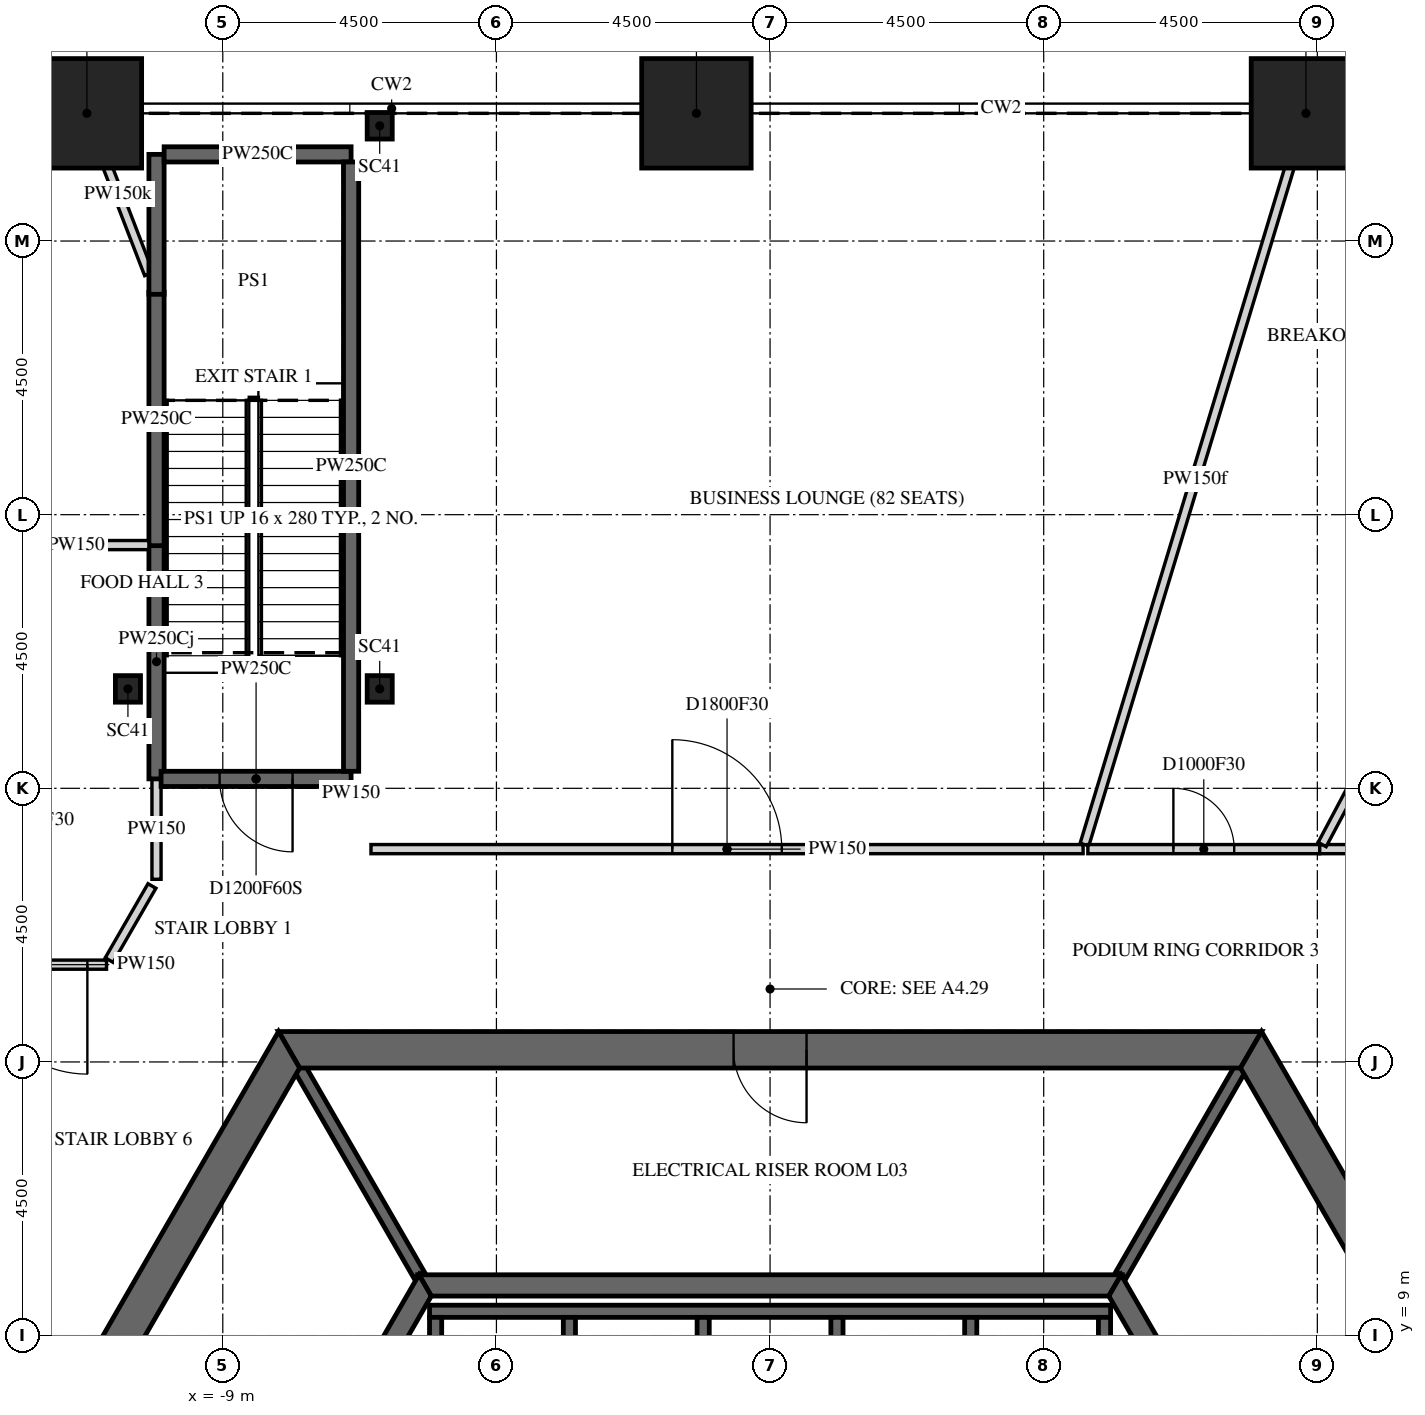
"""IFC4 building model, lengths in metres.
Left out: names, types, materials, properties, quantities, classifications, styles, units other than length and angle.
Written with IfcOpenShell. Run it as: python <this file> out.ifc"""

import sys

from ifc_helpers import new_model, si_unit, direction, frame, frame_2d, origin, origin_2d, place, context, subcontext, project, spatial, polyline, rectangle, i_section, outline, extrude, element, fill, save


model = new_model("IFC4")
c1 = context("Model", 3, precision=1e-05, world=origin(), true_north=direction((0.0, 1.0)))
c2 = subcontext(c1, "Body", "Model", "MODEL_VIEW")
j1 = project(units=[si_unit("LENGTHUNIT", "METRE"), si_unit("PLANEANGLEUNIT", "RADIAN")], contexts=[c1])
p1 = place(None, origin())
s1 = spatial("IfcSite", under=j1, at=p1, CompositionType="ELEMENT")
p2 = place(p1, origin())
s2 = spatial("IfcBuilding", under=s1, at=p2, CompositionType="ELEMENT")
p3 = place(p2, frame((0.0, 0.0, 20.5)))
s3 = spatial("IfcBuildingStorey", under=s2, at=p3, CompositionType="ELEMENT", Elevation=20.5)
for number, where, z_axis, x_axis in (
    (1, (8.812, 29.1, -0.25), (0.0, 0.0, 1.0), (1.0, 0.0, 0.0)),
    (2, (-1.211, 29.1, -0.25), (0.0, 0.0, 1.0), (1.0, 0.0, 0.0)),
    (3, (-11.235, 29.1, -0.25), (0.0, 0.0, 1.0), (1.0, 0.0, 0.0)),
):
    element("IfcColumn", number, at=place(p3, frame(where, z_axis=z_axis, x_axis=x_axis)), inside=s3, PredefinedType="COLUMN", context=c2, shape_type="SweptSolid", body=[
        extrude(rectangle(XDim=1.8, YDim=1.8, at=origin_2d()), origin(), (0.0, 0.0, 1.0), 5.5),
    ])
for number, where, z_axis, x_axis in (
    (4, (-6.419, 28.895, -0.25), (0.0, 0.0, 1.0), (1.0, 0.0, 0.0)),
    (5, (-6.419, 19.635, -0.25), (0.0, 0.0, 1.0), (1.0, 0.0, 0.0)),
    (6, (-10.56, 19.635, -0.25), (0.0, 0.0, 1.0), (1.0, 0.0, 0.0)),
):
    element("IfcColumn", number, at=place(p3, frame(where, z_axis=z_axis, x_axis=x_axis)), inside=s3, PredefinedType="COLUMN", context=c2, shape_type="SweptSolid", body=[
        extrude(i_section(OverallWidth=0.412, OverallDepth=0.437, WebThickness=0.036, FlangeThickness=0.058, FilletRadius=0.015, at=origin_2d()), origin(), (0.0, 0.0, 1.0), 5.5),
    ])
p4 = place(p3, frame((-7.91, 13.7, -0.25), z_axis=(0.0, 0.0, 1.0), x_axis=(-0.499999880136, -0.866025472988, 0.0)))
e7 = element("IfcWall", 7, at=p4, inside=s3, PredefinedType="SHEAR", context=c2, shape_type="SweptSolid", body=[
    extrude(outline(polyline([(-0.173, -0.3), (15.993, -0.3), (15.646, 0.3), (0.173, 0.3), (-0.173, -0.3)])), origin(), (0.0, 0.0, 1.0), 5.5),
])
p5 = place(p4, frame((7.039, 0.0, 0.25)))
e8 = element("IfcOpeningElement", 8, at=p5, cuts=e7, PredefinedType="OPENING", context=c2, shape_type="SweptSolid", body=[
    extrude(rectangle(XDim=1.8, YDim=2.4, at=frame_2d((0.9, 1.2))), frame((0.0, 0.31, 0.0), z_axis=(0.0, -1.0, 0.0), x_axis=(1.0, 0.0, 0.0)), (0.0, 0.0, 1.0), 0.62),
])
p6 = place(p3, frame((15.819, 0.0, -0.25), z_axis=(0.0, 0.0, 1.0), x_axis=(-0.499999880136, 0.866025472988, 0.0)))
e9 = element("IfcWall", 9, at=p6, inside=s3, PredefinedType="SHEAR", context=c2, shape_type="SweptSolid", body=[
    extrude(outline(polyline([(-0.173, -0.3), (15.993, -0.3), (15.646, 0.3), (0.173, 0.3), (-0.173, -0.3)])), origin(), (0.0, 0.0, 1.0), 5.5),
])
p7 = place(p6, frame((6.981, 0.0, 0.25)))
e10 = element("IfcOpeningElement", 10, at=p7, cuts=e9, PredefinedType="OPENING", context=c2, shape_type="SweptSolid", body=[
    extrude(rectangle(XDim=1.8, YDim=2.4, at=frame_2d((0.9, 1.2))), frame((0.0, 0.31, 0.0), z_axis=(0.0, -1.0, 0.0), x_axis=(1.0, 0.0, 0.0)), (0.0, 0.0, 1.0), 0.62),
])
p8 = place(p3, frame((7.91, 13.7, -0.25), z_axis=(0.0, 0.0, 1.0), x_axis=(-1.0, 0.0, 0.0)))
e11 = element("IfcWall", 11, at=p8, inside=s3, PredefinedType="SHEAR", context=c2, shape_type="SweptSolid", body=[
    extrude(outline(polyline([(-0.173, -0.3), (15.993, -0.3), (15.646, 0.3), (0.173, 0.3), (-0.173, -0.3)])), origin(), (0.0, 0.0, 1.0), 5.5),
])
p9 = place(p8, frame((7.31, 0.0, 0.25)))
e12 = element("IfcOpeningElement", 12, at=p9, cuts=e11, PredefinedType="OPENING", context=c2, shape_type="SweptSolid", body=[
    extrude(rectangle(XDim=1.2, YDim=2.4, at=frame_2d((0.6, 1.2))), frame((0.0, 0.31, 0.0), z_axis=(0.0, -1.0, 0.0), x_axis=(1.0, 0.0, 0.0)), (0.0, 0.0, 1.0), 0.62),
])
p10 = place(p3, frame((-5.673, 9.825, -0.25), z_axis=(0.0, 0.0, 1.0), x_axis=(-0.499995046907, -0.866028263435, 0.0)))
e13 = element("IfcWall", 13, at=p10, inside=s3, PredefinedType="SHEAR", context=c2, shape_type="SweptSolid", body=[
    extrude(outline(polyline([(-0.101, -0.175), (11.446, -0.175), (11.244, 0.175), (0.101, 0.175), (-0.101, -0.175)])), origin(), (0.0, 0.0, 1.0), 5.5),
])
p11 = place(p10, frame((4.801, 0.0, 0.25)))
e14 = element("IfcOpeningElement", 14, at=p11, cuts=e13, PredefinedType="OPENING", context=c2, shape_type="SweptSolid", body=[
    extrude(rectangle(XDim=1.8, YDim=2.4, at=frame_2d((0.9, 1.2))), frame((0.0, 0.185, 0.0), z_axis=(0.0, -1.0, 0.0), x_axis=(1.0, 0.0, 0.0)), (0.0, 0.0, 1.0), 0.37),
])
p12 = place(p3, frame((11.345, 0.0, -0.25), z_axis=(0.0, 0.0, 1.0), x_axis=(-0.499995046907, 0.866028263435, 0.0)))
e15 = element("IfcWall", 15, at=p12, inside=s3, PredefinedType="SHEAR", context=c2, shape_type="SweptSolid", body=[
    extrude(outline(polyline([(-0.101, -0.175), (11.446, -0.175), (11.244, 0.175), (0.101, 0.175), (-0.101, -0.175)])), origin(), (0.0, 0.0, 1.0), 5.5),
])
p13 = place(p12, frame((4.744, 0.0, 0.25)))
e16 = element("IfcOpeningElement", 16, at=p13, cuts=e15, PredefinedType="OPENING", context=c2, shape_type="SweptSolid", body=[
    extrude(rectangle(XDim=1.8, YDim=2.4, at=frame_2d((0.9, 1.2))), frame((0.0, 0.185, 0.0), z_axis=(0.0, -1.0, 0.0), x_axis=(1.0, 0.0, 0.0)), (0.0, 0.0, 1.0), 0.37),
])
p14 = place(p3, frame((5.673, 9.825, -0.25), z_axis=(0.0, 0.0, 1.0), x_axis=(-1.0, 0.0, 0.0)))
e17 = element("IfcWall", 17, at=p14, inside=s3, PredefinedType="SHEAR", context=c2, shape_type="SweptSolid", body=[
    extrude(outline(polyline([(-0.101, -0.175), (11.446, -0.175), (11.244, 0.175), (0.101, 0.175), (-0.101, -0.175)])), origin(), (0.0, 0.0, 1.0), 5.5),
])
p15 = place(p3, frame((-5.6, 9.4, -0.25), z_axis=(0.0, 0.0, 1.0), x_axis=(1.0, 0.0, 0.0)))
e18 = element("IfcWall", 18, at=p15, inside=s3, PredefinedType="SHEAR", context=c2, shape_type="SweptSolid", body=[
    extrude(rectangle(XDim=11.2, YDim=0.2, at=frame_2d((5.6, 0.0))), origin(), (0.0, 0.0, 1.0), 5.5),
])
for number, where, z_axis, x_axis in (
    (19, (-5.5, 6.4, -0.25), (0.0, 0.0, 1.0), (0.0, 1.0, 0.0)),
    (20, (-3.3, 6.4, -0.25), (0.0, 0.0, 1.0), (0.0, 1.0, 0.0)),
    (21, (-1.1, 6.4, -0.25), (0.0, 0.0, 1.0), (0.0, 1.0, 0.0)),
    (22, (1.1, 6.4, -0.25), (0.0, 0.0, 1.0), (0.0, 1.0, 0.0)),
    (23, (3.3, 6.4, -0.25), (0.0, 0.0, 1.0), (0.0, 1.0, 0.0)),
    (24, (5.5, 6.4, -0.25), (0.0, 0.0, 1.0), (0.0, 1.0, 0.0)),
):
    element("IfcWall", number, at=place(p3, frame(where, z_axis=z_axis, x_axis=x_axis)), inside=s3, PredefinedType="SHEAR", context=c2, shape_type="SweptSolid", body=[
        extrude(rectangle(XDim=2.9, YDim=0.2, at=frame_2d((1.45, 0.0))), origin(), (0.0, 0.0, 1.0), 5.5),
    ])
for number, where, z_axis, x_axis in (
    (25, (5.773, 10.0, -0.25), (0.0, 0.0, 1.0), (0.5, 0.866, 0.0)),
    (26, (-5.773, 10.0, -0.25), (0.0, 0.0, 1.0), (-0.5, 0.866, 0.0)),
):
    element("IfcWall", number, at=place(p3, frame(where, z_axis=z_axis, x_axis=x_axis)), inside=s3, PredefinedType="SHEAR", context=c2, shape_type="SweptSolid", body=[
        extrude(rectangle(XDim=3.926, YDim=0.2, at=frame_2d((1.963, 0.0))), origin(), (0.0, 0.0, 1.0), 5.5),
    ])
p16 = place(p3, frame((-10.912, 15.1, 0.0), z_axis=(0.0, 0.0, 1.0), x_axis=(-1.0, 0.0, 0.0)))
e27 = element("IfcWall", 27, at=p16, inside=s3, PredefinedType="PARTITIONING", context=c2, shape_type="SweptSolid", body=[
    extrude(rectangle(XDim=2.328, YDim=0.15, at=frame_2d((1.164, 0.0))), origin(), (0.0, 0.0, 1.0), 5.25),
])
p17 = place(p16, frame((0.315, 0.0, 0.0)))
e28 = element("IfcOpeningElement", 28, at=p17, cuts=e27, PredefinedType="OPENING", context=c2, shape_type="SweptSolid", body=[
    extrude(rectangle(XDim=1.8, YDim=2.1, at=frame_2d((0.9, 1.05))), frame((0.0, 0.085, 0.0), z_axis=(0.0, -1.0, 0.0), x_axis=(1.0, 0.0, 0.0)), (0.0, 0.0, 1.0), 0.17),
])
p18 = place(p3, frame((-11.235, 29.1, 0.0), z_axis=(0.0, 0.0, 1.0), x_axis=(0.360012438309, -0.932947503487, 0.0)))
e29 = element("IfcWall", 29, at=p18, inside=s3, PredefinedType="PARTITIONING", context=c2, shape_type="SweptSolid", body=[
    extrude(rectangle(XDim=2.833, YDim=0.15, at=frame_2d((1.417, 0.0))), origin(), (0.0, 0.0, 1.0), 4.323),
])
p19 = place(p3, frame((-10.09, 16.504, 0.0), z_axis=(0.0, 0.0, 1.0), x_axis=(0.0, 1.0, 0.0)))
e30 = element("IfcWall", 30, at=p19, inside=s3, PredefinedType="PARTITIONING", context=c2, shape_type="SweptSolid", body=[
    extrude(rectangle(XDim=1.651, YDim=0.15, at=frame_2d((0.826, 0.0))), origin(), (0.0, 0.0, 1.0), 5.25),
])
p20 = place(p3, frame((-10.165, 16.394, 0.0), z_axis=(0.0, 0.0, 1.0), x_axis=(-0.499907644242, -0.866078718841, 0.0)))
e31 = element("IfcWall", 31, at=p20, inside=s3, PredefinedType="PARTITIONING", context=c2, shape_type="SweptSolid", body=[
    extrude(rectangle(XDim=1.407, YDim=0.15, at=frame_2d((0.704, 0.0))), origin(), (0.0, 0.0, 1.0), 5.25),
])
p21 = place(p3, frame((-10.09, 18.155, 0.0), z_axis=(0.0, 0.0, 1.0), x_axis=(0.0, 1.0, 0.0)))
e32 = element("IfcWall", 32, at=p21, inside=s3, PredefinedType="PARTITIONING", context=c2, shape_type="SweptSolid", body=[
    extrude(rectangle(XDim=3.855, YDim=0.25, at=frame_2d((1.927, 0.0))), origin(), (0.0, 0.0, 1.0), 4.717),
])
p22 = place(p3, frame((-6.89, 18.155, 0.0), z_axis=(0.0, 0.0, 1.0), x_axis=(-1.0, 0.0, 0.0)))
e33 = element("IfcWall", 33, at=p22, inside=s3, PredefinedType="PARTITIONING", context=c2, shape_type="SweptSolid", body=[
    extrude(rectangle(XDim=3.125, YDim=0.25, at=frame_2d((1.562, 0.0))), origin(), (0.0, 0.0, 1.0), 5.25),
])
p23 = place(p22, frame((0.962, 0.0, 0.0)))
e34 = element("IfcOpeningElement", 34, at=p23, cuts=e33, PredefinedType="OPENING", context=c2, shape_type="SweptSolid", body=[
    extrude(rectangle(XDim=1.2, YDim=2.1, at=frame_2d((0.6, 1.05))), frame((0.0, 0.135, 0.0), z_axis=(0.0, -1.0, 0.0), x_axis=(1.0, 0.0, 0.0)), (0.0, 0.0, 1.0), 0.27),
])
p24 = place(p3, frame((-10.09, 21.99, 0.0), z_axis=(0.0, 0.0, 1.0), x_axis=(0.0, 1.0, 0.0)))
e35 = element("IfcWall", 35, at=p24, inside=s3, PredefinedType="PARTITIONING", context=c2, shape_type="SweptSolid", body=[
    extrude(rectangle(XDim=4.17, YDim=0.25, at=frame_2d((2.085, 0.0))), origin(), (0.0, 0.0, 1.0), 5.25),
])
p25 = place(p3, frame((-10.215, 22.0, 0.0), z_axis=(0.0, 0.0, 1.0), x_axis=(-1.0, 0.0, 0.0)))
e36 = element("IfcWall", 36, at=p25, inside=s3, PredefinedType="PARTITIONING", context=c2, shape_type="SweptSolid", body=[
    extrude(rectangle(XDim=2.4, YDim=0.15, at=frame_2d((1.2, 0.0))), origin(), (0.0, 0.0, 1.0), 5.25),
])
p26 = place(p3, frame((-10.09, 26.124, 0.0), z_axis=(0.0, 0.0, 1.0), x_axis=(0.0, 1.0, 0.0)))
e37 = element("IfcWall", 37, at=p26, inside=s3, PredefinedType="PARTITIONING", context=c2, shape_type="SweptSolid", body=[
    extrude(rectangle(XDim=2.301, YDim=0.25, at=frame_2d((1.15, 0.0))), origin(), (0.0, 0.0, 1.0), 5.25),
])
p27 = place(p3, frame((-9.965, 28.425, 0.0), z_axis=(0.0, 0.0, 1.0), x_axis=(1.0, 0.0, 0.0)))
e38 = element("IfcWall", 38, at=p27, inside=s3, PredefinedType="PARTITIONING", context=c2, shape_type="SweptSolid", body=[
    extrude(rectangle(XDim=3.075, YDim=0.25, at=frame_2d((1.538, 0.0))), origin(), (0.0, 0.0, 1.0), 5.25),
])
p28 = place(p3, frame((-6.89, 18.03, 0.0), z_axis=(0.0, 0.0, 1.0), x_axis=(0.0, -1.0, 0.0)))
e39 = element("IfcWall", 39, at=p28, inside=s3, PredefinedType="PARTITIONING", context=c2, shape_type="SweptSolid", body=[
    extrude(rectangle(XDim=0.211, YDim=0.15, at=frame_2d((0.105, 0.0))), origin(), (0.0, 0.0, 1.0), 5.25),
])
p29 = place(p3, frame((-6.89, 28.3, 0.0), z_axis=(0.0, 0.0, 1.0), x_axis=(0.0, -1.0, 0.0)))
e40 = element("IfcWall", 40, at=p29, inside=s3, PredefinedType="PARTITIONING", context=c2, shape_type="SweptSolid", body=[
    extrude(rectangle(XDim=10.02, YDim=0.25, at=frame_2d((5.01, 0.0))), origin(), (0.0, 0.0, 1.0), 5.25),
])
p30 = place(p3, frame((-6.563, 17.0, 0.0), z_axis=(0.0, 0.0, 1.0), x_axis=(1.0, 0.0, 0.0)))
e41 = element("IfcWall", 41, at=p30, inside=s3, PredefinedType="PARTITIONING", context=c2, shape_type="SweptSolid", body=[
    extrude(rectangle(XDim=11.711, YDim=0.15, at=frame_2d((5.855, 0.0))), origin(), (0.0, 0.0, 1.0), 5.25),
])
p31 = place(p30, frame((4.956, 0.0, 0.0)))
e42 = element("IfcOpeningElement", 42, at=p31, cuts=e41, PredefinedType="OPENING", context=c2, shape_type="SweptSolid", body=[
    extrude(rectangle(XDim=1.8, YDim=2.1, at=frame_2d((0.9, 1.05))), frame((0.0, 0.085, 0.0), z_axis=(0.0, -1.0, 0.0), x_axis=(1.0, 0.0, 0.0)), (0.0, 0.0, 1.0), 0.17),
])
p32 = place(p3, frame((5.171, 17.075, 0.0), z_axis=(0.0, 0.0, 1.0), x_axis=(0.289887131616, 0.957060839719, 0.0)))
e43 = element("IfcWall", 43, at=p32, inside=s3, PredefinedType="PARTITIONING", context=c2, shape_type="SweptSolid", body=[
    extrude(rectangle(XDim=12.565, YDim=0.15, at=frame_2d((6.282, 0.0))), origin(), (0.0, 0.0, 1.0), 4.496),
])
p33 = place(p3, frame((5.226, 17.0, 0.0), z_axis=(0.0, 0.0, 1.0), x_axis=(1.0, 0.0, 0.0)))
e44 = element("IfcWall", 44, at=p33, inside=s3, PredefinedType="PARTITIONING", context=c2, shape_type="SweptSolid", body=[
    extrude(rectangle(XDim=3.813, YDim=0.15, at=frame_2d((1.906, 0.0))), origin(), (0.0, 0.0, 1.0), 5.25),
])
p34 = place(p33, frame((1.406, 0.0, 0.0)))
e45 = element("IfcOpeningElement", 45, at=p34, cuts=e44, PredefinedType="OPENING", context=c2, shape_type="SweptSolid", body=[
    extrude(rectangle(XDim=1.0, YDim=2.1, at=frame_2d((0.5, 1.05))), frame((0.0, 0.085, 0.0), z_axis=(0.0, -1.0, 0.0), x_axis=(1.0, 0.0, 0.0)), (0.0, 0.0, 1.0), 0.17),
])
p35 = place(p3, frame((9.815, 17.0, 0.0), z_axis=(0.0, 0.0, 1.0), x_axis=(-1.0, 0.0, 0.0)))
e46 = element("IfcWall", 46, at=p35, inside=s3, PredefinedType="PARTITIONING", context=c2, shape_type="SweptSolid", body=[
    extrude(rectangle(XDim=0.776, YDim=0.15, at=frame_2d((0.388, 0.0))), origin(), (0.0, 0.0, 1.0), 5.25),
])
p36 = place(p3, frame((15.261, 28.701, 0.0), z_axis=(0.0, 0.0, 1.0), x_axis=(-0.469500426527, -0.882932245131, 0.0)))
e47 = element("IfcWall", 47, at=p36, inside=s3, PredefinedType="PARTITIONING", context=c2, shape_type="SweptSolid", body=[
    extrude(rectangle(XDim=13.167, YDim=0.15, at=frame_2d((6.584, 0.0))), origin(), (0.0, 0.0, 1.0), 4.488),
])
p37 = place(p9, origin())
e48 = element("IfcDoor", 48, at=p37, inside=s3, OperationType="SINGLE_SWING_LEFT", PredefinedType="DOOR", context=c2, shape_type="SweptSolid", body=[
    extrude(rectangle(XDim=1.2, YDim=2.4, at=frame_2d((0.6, 1.2))), frame((0.0, 0.025, 0.0), z_axis=(0.0, -1.0, 0.0), x_axis=(1.0, 0.0, 0.0)), (0.0, 0.0, 1.0), 0.05),
])
fill(e12, e48)
p38 = place(p17, origin())
e49 = element("IfcDoor", 49, at=p38, inside=s3, OperationType="DOUBLE_DOOR_SINGLE_SWING", PredefinedType="DOOR", context=c2, shape_type="SweptSolid", body=[
    extrude(rectangle(XDim=1.8, YDim=2.1, at=frame_2d((0.9, 1.05))), frame((0.0, 0.025, 0.0), z_axis=(0.0, -1.0, 0.0), x_axis=(1.0, 0.0, 0.0)), (0.0, 0.0, 1.0), 0.05),
])
fill(e28, e49)
p39 = place(p23, origin())
e50 = element("IfcDoor", 50, at=p39, inside=s3, OperationType="SINGLE_SWING_RIGHT", PredefinedType="DOOR", context=c2, shape_type="SweptSolid", body=[
    extrude(rectangle(XDim=1.2, YDim=2.1, at=frame_2d((0.6, 1.05))), frame((0.0, 0.025, 0.0), z_axis=(0.0, -1.0, 0.0), x_axis=(1.0, 0.0, 0.0)), (0.0, 0.0, 1.0), 0.05),
])
fill(e34, e50)
p40 = place(p31, origin())
e51 = element("IfcDoor", 51, at=p40, inside=s3, OperationType="DOUBLE_DOOR_SINGLE_SWING", PredefinedType="DOOR", context=c2, shape_type="SweptSolid", body=[
    extrude(rectangle(XDim=1.8, YDim=2.1, at=frame_2d((0.9, 1.05))), frame((0.0, 0.025, 0.0), z_axis=(0.0, -1.0, 0.0), x_axis=(1.0, 0.0, 0.0)), (0.0, 0.0, 1.0), 0.05),
])
fill(e42, e51)
p41 = place(p34, origin())
e52 = element("IfcDoor", 52, at=p41, inside=s3, OperationType="SINGLE_SWING_LEFT", PredefinedType="DOOR", context=c2, shape_type="SweptSolid", body=[
    extrude(rectangle(XDim=1.0, YDim=2.1, at=frame_2d((0.5, 1.05))), frame((0.0, 0.025, 0.0), z_axis=(0.0, -1.0, 0.0), x_axis=(1.0, 0.0, 0.0)), (0.0, 0.0, 1.0), 0.05),
])
fill(e45, e52)
save(model, sys.argv[1])
